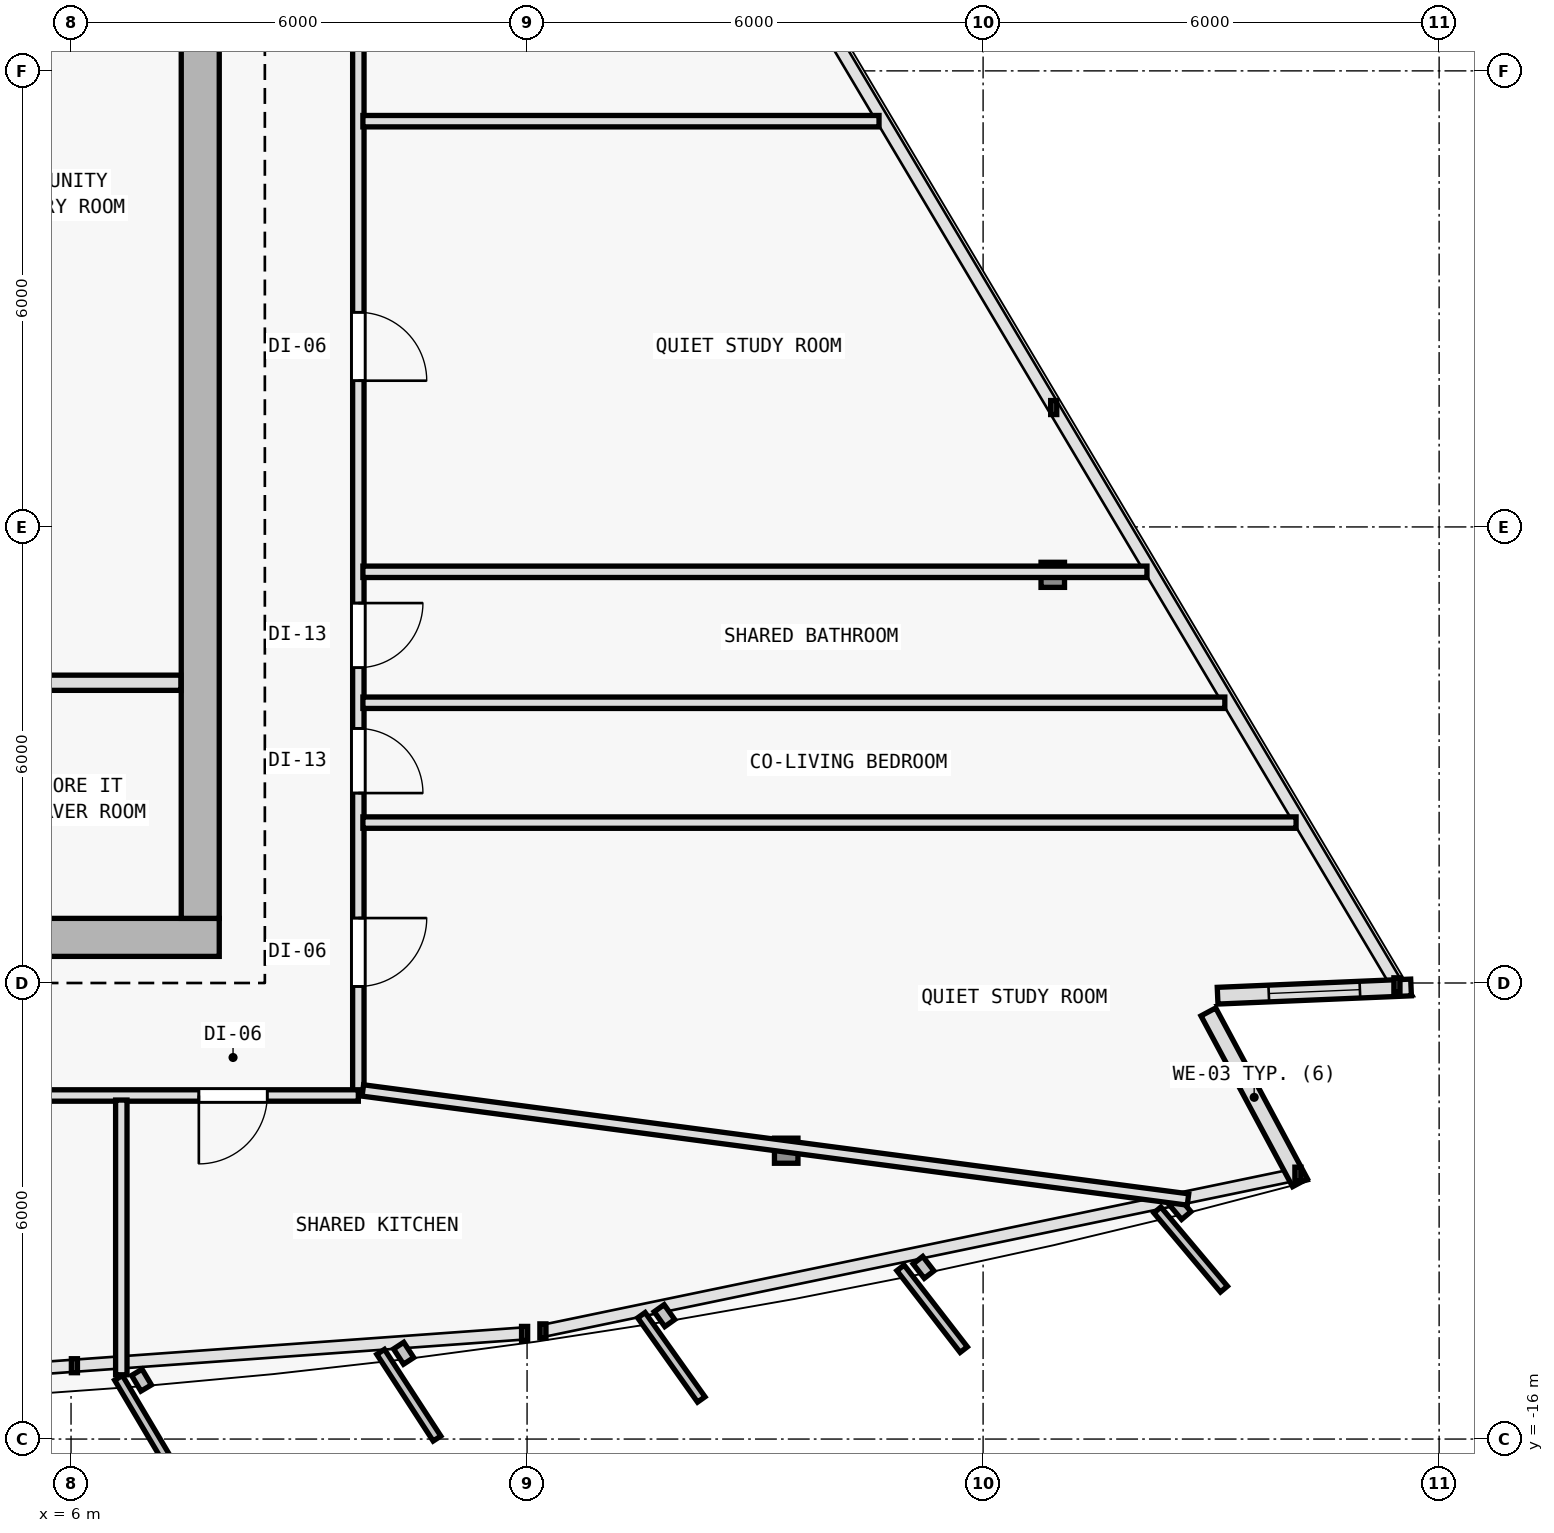
"""IFC4 building model, lengths in metres.
Left out: names, types, materials, properties, quantities, classifications, styles, units other than length and angle.
Written with IfcOpenShell. Run it as: python <this file> out.ifc"""

import sys

from ifc_helpers import new_model, si_unit, direction, frame, frame_2d, origin, origin_2d, place, context, subcontext, project, spatial, rectangle, i_section, extrude, element, fill, save


model = new_model("IFC4")
c1 = context("Model", 3, precision=1e-05, world=origin(), true_north=direction((0.0, 1.0)))
c2 = subcontext(c1, "Body", "Model", "MODEL_VIEW")
j1 = project(units=[si_unit("LENGTHUNIT", "METRE"), si_unit("PLANEANGLEUNIT", "RADIAN")], contexts=[c1])
p1 = place(None, origin())
s1 = spatial("IfcSite", under=j1, at=p1, CompositionType="ELEMENT")
p2 = place(p1, origin())
s2 = spatial("IfcBuilding", under=s1, at=p2, CompositionType="ELEMENT")
p3 = place(p2, frame((0.0, 0.0, 276.0)))
s3 = spatial("IfcBuildingStorey", under=s2, at=p3, CompositionType="ELEMENT", Elevation=276.0)
for number, where, z_axis, x_axis in (
    (1, (7.7, -9.4, 0.0), (0.0, 0.0, 1.0), (1.0, 0.0, 0.0)),
    (2, (7.7, 0.4, 0.0), (0.0, 0.0, 1.0), (1.0, 0.0, 0.0)),
):
    element("IfcColumn", number, at=place(p3, frame(where, z_axis=z_axis, x_axis=x_axis)), inside=s3, PredefinedType="COLUMN", context=c2, shape_type="SweptSolid", body=[
        extrude(i_section(OverallWidth=0.374, OverallDepth=0.372, WebThickness=0.012, FlangeThickness=0.02, FilletRadius=0.015, at=origin_2d()), origin(), (0.0, 0.0, 1.0), 3.6),
    ])
p4 = place(p3, frame((15.409, -12.207, 0.006), z_axis=(-0.021207106828, 0.034461548595, 0.999180994759), x_axis=(-0.851658316705, -0.524097425664, 0.0)))
e3 = element("IfcColumn", 3, at=p4, inside=s3, PredefinedType="COLUMN", context=c2, shape_type="SweptSolid", body=[
    extrude(i_section(OverallWidth=0.309, OverallDepth=0.33, WebThickness=0.011, FlangeThickness=0.019, FilletRadius=0.027, at=origin_2d()), origin(), (0.0, 0.0, 1.0), 3.592),
])
p5 = place(p3, frame((18.917, -4.63, 0.006), z_axis=(-0.026786477051, 0.022231416233, 0.999393940736), x_axis=(-0.638646294968, -0.7695004288, 0.0)))
e4 = element("IfcColumn", 4, at=p5, inside=s3, PredefinedType="COLUMN", context=c2, shape_type="SweptSolid", body=[
    extrude(i_section(OverallWidth=0.309, OverallDepth=0.33, WebThickness=0.011, FlangeThickness=0.019, FilletRadius=0.027, at=origin_2d()), origin(), (0.0, 0.0, 1.0), 3.591),
])
p6 = place(p3, frame((20.964, -10.381, 0.0), z_axis=(0.0, 0.0, 1.0), x_axis=(0.472728849632, -0.881207940685, 0.0)))
e5 = element("IfcWall", 5, at=p6, inside=s3, PredefinedType="SOLIDWALL", context=c2, shape_type="SweptSolid", body=[
    extrude(rectangle(XDim=2.55, YDim=0.22, at=frame_2d((1.275, 0.0))), origin(), (0.0, 0.0, 1.0), 3.35),
])
p7 = place(p3, frame((23.631, -10.059, 0.0), z_axis=(0.0, 0.0, 1.0), x_axis=(-0.999098350703, -0.042455690107, 0.0)))
e6 = element("IfcWall", 6, at=p7, inside=s3, PredefinedType="SOLIDWALL", context=c2, shape_type="SweptSolid", body=[
    extrude(rectangle(XDim=2.547, YDim=0.22, at=frame_2d((1.274, 0.0))), origin(), (0.0, 0.0, 1.0), 3.35),
])
p8 = place(p7, frame((0.674, 0.0, 0.62)))
e7 = element("IfcOpeningElement", 7, at=p8, cuts=e6, PredefinedType="OPENING", context=c2, shape_type="SweptSolid", body=[
    extrude(rectangle(XDim=1.2, YDim=1.8, at=frame_2d((0.6, 0.9))), frame((0.0, 0.12, 0.0), z_axis=(0.0, -1.0, 0.0), x_axis=(1.0, 0.0, 0.0)), (0.0, 0.0, 1.0), 0.24),
])
p9 = place(p3, frame((-7.95, -9.4, 0.0), z_axis=(0.0, 0.0, 1.0), x_axis=(1.0, 0.0, 0.0)))
e8 = element("IfcWall", 8, at=p9, inside=s3, PredefinedType="SHEAR", context=c2, shape_type="SweptSolid", body=[
    extrude(rectangle(XDim=15.9, YDim=0.5, at=frame_2d((7.95, 0.0))), origin(), (0.0, 0.0, 1.0), 3.35),
])
p10 = place(p9, frame((9.6, 0.0, 0.0)))
e9 = element("IfcOpeningElement", 9, at=p10, cuts=e8, PredefinedType="OPENING", context=c2, shape_type="SweptSolid", body=[
    extrude(rectangle(XDim=1.5, YDim=2.2, at=frame_2d((0.75, 1.1))), frame((0.0, 0.26, 0.0), z_axis=(0.0, -1.0, 0.0), x_axis=(1.0, 0.0, 0.0)), (0.0, 0.0, 1.0), 0.52),
])
p11 = place(p3, frame((7.7, 9.95, 0.0), z_axis=(0.0, 0.0, 1.0), x_axis=(0.0, -1.0, 0.0)))
e10 = element("IfcWall", 10, at=p11, inside=s3, PredefinedType="SHEAR", context=c2, shape_type="SweptSolid", body=[
    extrude(rectangle(XDim=19.1, YDim=0.5, at=frame_2d((9.55, 0.0))), origin(), (0.0, 0.0, 1.0), 3.35),
])
p12 = place(p3, frame((4.15, -6.05, 0.0), z_axis=(0.0, 0.0, 1.0), x_axis=(1.0, 0.0, 0.0)))
e11 = element("IfcWall", 11, at=p12, inside=s3, PredefinedType="SOLIDWALL", context=c2, shape_type="SweptSolid", body=[
    extrude(rectangle(XDim=3.295, YDim=0.2, at=frame_2d((1.647, 0.0))), origin(), (0.0, 0.0, 1.0), 3.35),
])
p13 = place(p3, frame((9.78, 8.226, 0.0), z_axis=(0.0, 0.0, 1.0), x_axis=(0.0, -1.0, 0.0)))
e12 = element("IfcWall", 12, at=p13, inside=s3, PredefinedType="PARTITIONING", context=c2, shape_type="SweptSolid", body=[
    extrude(rectangle(XDim=19.706, YDim=0.15, at=frame_2d((9.853, 0.0))), origin(), (0.0, 0.0, 1.0), 2.725),
])
p14 = place(p13, frame((17.372, 0.0, 0.0)))
e13 = element("IfcOpeningElement", 13, at=p14, cuts=e12, PredefinedType="OPENING", context=c2, shape_type="SweptSolid", body=[
    extrude(rectangle(XDim=0.9, YDim=2.1, at=frame_2d((0.45, 1.05))), frame((0.0, 0.085, 0.0), z_axis=(0.0, -1.0, 0.0), x_axis=(1.0, 0.0, 0.0)), (0.0, 0.0, 1.0), 0.17),
])
p15 = place(p13, frame((14.877, 0.0, 0.0)))
e14 = element("IfcOpeningElement", 14, at=p15, cuts=e12, PredefinedType="OPENING", context=c2, shape_type="SweptSolid", body=[
    extrude(rectangle(XDim=0.85, YDim=2.1, at=frame_2d((0.425, 1.05))), frame((0.0, 0.085, 0.0), z_axis=(0.0, -1.0, 0.0), x_axis=(1.0, 0.0, 0.0)), (0.0, 0.0, 1.0), 0.17),
])
p16 = place(p13, frame((13.228, 0.0, 0.0)))
e15 = element("IfcOpeningElement", 15, at=p16, cuts=e12, PredefinedType="OPENING", context=c2, shape_type="SweptSolid", body=[
    extrude(rectangle(XDim=0.85, YDim=2.1, at=frame_2d((0.425, 1.05))), frame((0.0, 0.085, 0.0), z_axis=(0.0, -1.0, 0.0), x_axis=(1.0, 0.0, 0.0)), (0.0, 0.0, 1.0), 0.17),
])
p17 = place(p13, frame((9.402, 0.0, 0.0)))
e16 = element("IfcOpeningElement", 16, at=p17, cuts=e12, PredefinedType="OPENING", context=c2, shape_type="SweptSolid", body=[
    extrude(rectangle(XDim=0.9, YDim=2.1, at=frame_2d((0.45, 1.05))), frame((0.0, 0.085, 0.0), z_axis=(0.0, -1.0, 0.0), x_axis=(1.0, 0.0, 0.0)), (0.0, 0.0, 1.0), 0.17),
])
p18 = place(p13, frame((3.083, 0.0, 0.0)))
e17 = element("IfcOpeningElement", 17, at=p18, cuts=e12, PredefinedType="OPENING", context=c2, shape_type="SweptSolid", body=[
    extrude(rectangle(XDim=0.9, YDim=2.1, at=frame_2d((0.45, 1.05))), frame((0.0, 0.085, 0.0), z_axis=(0.0, -1.0, 0.0), x_axis=(1.0, 0.0, 0.0)), (0.0, 0.0, 1.0), 0.17),
])
p19 = place(p3, frame((9.78, -11.48, 0.0), z_axis=(0.0, 0.0, 1.0), x_axis=(-1.0, 0.0, 0.0)))
e18 = element("IfcWall", 18, at=p19, inside=s3, PredefinedType="PARTITIONING", context=c2, shape_type="SweptSolid", body=[
    extrude(rectangle(XDim=19.56, YDim=0.15, at=frame_2d((9.78, 0.0))), origin(), (0.0, 0.0, 1.0), 2.825),
])
p20 = place(p19, frame((16.707, 0.0, 0.0)))
e19 = element("IfcOpeningElement", 19, at=p20, cuts=e18, PredefinedType="OPENING", context=c2, shape_type="SweptSolid", body=[
    extrude(rectangle(XDim=0.9, YDim=2.1, at=frame_2d((0.45, 1.05))), frame((0.0, 0.085, 0.0), z_axis=(0.0, -1.0, 0.0), x_axis=(1.0, 0.0, 0.0)), (0.0, 0.0, 1.0), 0.17),
])
p21 = place(p19, frame((8.575, 0.0, 0.0)))
e20 = element("IfcOpeningElement", 20, at=p21, cuts=e18, PredefinedType="OPENING", context=c2, shape_type="SweptSolid", body=[
    extrude(rectangle(XDim=0.9, YDim=2.1, at=frame_2d((0.45, 1.05))), frame((0.0, 0.085, 0.0), z_axis=(0.0, -1.0, 0.0), x_axis=(1.0, 0.0, 0.0)), (0.0, 0.0, 1.0), 0.17),
])
p22 = place(p19, frame((1.198, 0.0, 0.0)))
e21 = element("IfcOpeningElement", 21, at=p22, cuts=e18, PredefinedType="OPENING", context=c2, shape_type="SweptSolid", body=[
    extrude(rectangle(XDim=0.9, YDim=2.1, at=frame_2d((0.45, 1.05))), frame((0.0, 0.085, 0.0), z_axis=(0.0, -1.0, 0.0), x_axis=(1.0, 0.0, 0.0)), (0.0, 0.0, 1.0), 0.17),
])
p23 = place(p3, frame((9.839, -11.414, 0.0), z_axis=(0.0, 0.0, 1.0), x_axis=(0.991382590764, -0.130998315755, 0.0)))
e22 = element("IfcWall", 22, at=p23, inside=s3, PredefinedType="PARTITIONING", context=c2, shape_type="SweptSolid", body=[
    extrude(rectangle(XDim=10.951, YDim=0.15, at=frame_2d((5.476, 0.0))), origin(), (0.0, 0.0, 1.0), 2.965),
])
p24 = place(p3, frame((9.84, -4.59, 0.0), z_axis=(0.0, 0.0, 1.0), x_axis=(1.0, 0.0, 0.0)))
e23 = element("IfcWall", 23, at=p24, inside=s3, PredefinedType="PARTITIONING", context=c2, shape_type="SweptSolid", body=[
    extrude(rectangle(XDim=10.316, YDim=0.15, at=frame_2d((5.158, 0.0))), origin(), (0.0, 0.0, 1.0), 2.725),
])
p25 = place(p3, frame((9.84, -7.89, 0.0), z_axis=(0.0, 0.0, 1.0), x_axis=(1.0, 0.0, 0.0)))
e24 = element("IfcWall", 24, at=p25, inside=s3, PredefinedType="PARTITIONING", context=c2, shape_type="SweptSolid", body=[
    extrude(rectangle(XDim=12.278, YDim=0.15, at=frame_2d((6.139, 0.0))), origin(), (0.0, 0.0, 1.0), 2.725),
])
p26 = place(p3, frame((6.661, -11.54, 0.0), z_axis=(0.0, 0.0, 1.0), x_axis=(0.0, -1.0, 0.0)))
e25 = element("IfcWall", 25, at=p26, inside=s3, PredefinedType="PARTITIONING", context=c2, shape_type="SweptSolid", body=[
    extrude(rectangle(XDim=3.614, YDim=0.15, at=frame_2d((1.807, 0.0))), origin(), (0.0, 0.0, 1.0), 2.965),
])
p27 = place(p3, frame((9.84, -6.313, 0.0), z_axis=(0.0, 0.0, 1.0), x_axis=(1.0, 0.0, 0.0)))
e26 = element("IfcWall", 26, at=p27, inside=s3, PredefinedType="PARTITIONING", context=c2, shape_type="SweptSolid", body=[
    extrude(rectangle(XDim=11.34, YDim=0.15, at=frame_2d((5.67, 0.0))), origin(), (0.0, 0.0, 1.0), 2.725),
])
p28 = place(p3, frame((9.84, 1.338, 0.0), z_axis=(0.0, 0.0, 1.0), x_axis=(1.0, 0.0, 0.0)))
e27 = element("IfcWall", 27, at=p28, inside=s3, PredefinedType="PARTITIONING", context=c2, shape_type="SweptSolid", body=[
    extrude(rectangle(XDim=6.791, YDim=0.15, at=frame_2d((3.395, 0.0))), origin(), (0.0, 0.0, 1.0), 3.015),
])
p29 = place(p8, origin())
e28 = element("IfcWindow", 28, at=p29, inside=s3, PartitioningType="SINGLE_PANEL", PredefinedType="WINDOW", context=c2, shape_type="SweptSolid", body=[
    extrude(rectangle(XDim=1.2, YDim=1.8, at=frame_2d((0.6, 0.9))), frame((0.0, 0.03, 0.0), z_axis=(0.0, -1.0, 0.0), x_axis=(1.0, 0.0, 0.0)), (0.0, 0.0, 1.0), 0.06),
])
fill(e7, e28)
p30 = place(p22, origin())
e29 = element("IfcDoor", 29, at=p30, inside=s3, OperationType="SINGLE_SWING_RIGHT", PredefinedType="DOOR", context=c2, shape_type="SweptSolid", body=[
    extrude(rectangle(XDim=0.9, YDim=2.1, at=frame_2d((0.45, 1.05))), frame((0.0, 0.025, 0.0), z_axis=(0.0, -1.0, 0.0), x_axis=(1.0, 0.0, 0.0)), (0.0, 0.0, 1.0), 0.05),
])
fill(e21, e29)
p31 = place(p14, origin())
e30 = element("IfcDoor", 30, at=p31, inside=s3, OperationType="SINGLE_SWING_LEFT", PredefinedType="DOOR", context=c2, shape_type="SweptSolid", body=[
    extrude(rectangle(XDim=0.9, YDim=2.1, at=frame_2d((0.45, 1.05))), frame((0.0, 0.025, 0.0), z_axis=(0.0, -1.0, 0.0), x_axis=(1.0, 0.0, 0.0)), (0.0, 0.0, 1.0), 0.05),
])
fill(e13, e30)
p32 = place(p15, origin())
e31 = element("IfcDoor", 31, at=p32, inside=s3, OperationType="SINGLE_SWING_RIGHT", PredefinedType="DOOR", context=c2, shape_type="SweptSolid", body=[
    extrude(rectangle(XDim=0.85, YDim=2.1, at=frame_2d((0.425, 1.05))), frame((0.0, 0.025, 0.0), z_axis=(0.0, -1.0, 0.0), x_axis=(1.0, 0.0, 0.0)), (0.0, 0.0, 1.0), 0.05),
])
fill(e14, e31)
p33 = place(p16, origin())
e32 = element("IfcDoor", 32, at=p33, inside=s3, OperationType="SINGLE_SWING_LEFT", PredefinedType="DOOR", context=c2, shape_type="SweptSolid", body=[
    extrude(rectangle(XDim=0.85, YDim=2.1, at=frame_2d((0.425, 1.05))), frame((0.0, 0.025, 0.0), z_axis=(0.0, -1.0, 0.0), x_axis=(1.0, 0.0, 0.0)), (0.0, 0.0, 1.0), 0.05),
])
fill(e15, e32)
p34 = place(p17, origin())
e33 = element("IfcDoor", 33, at=p34, inside=s3, OperationType="SINGLE_SWING_RIGHT", PredefinedType="DOOR", context=c2, shape_type="SweptSolid", body=[
    extrude(rectangle(XDim=0.9, YDim=2.1, at=frame_2d((0.45, 1.05))), frame((0.0, 0.025, 0.0), z_axis=(0.0, -1.0, 0.0), x_axis=(1.0, 0.0, 0.0)), (0.0, 0.0, 1.0), 0.05),
])
fill(e16, e33)
save(model, sys.argv[1])
